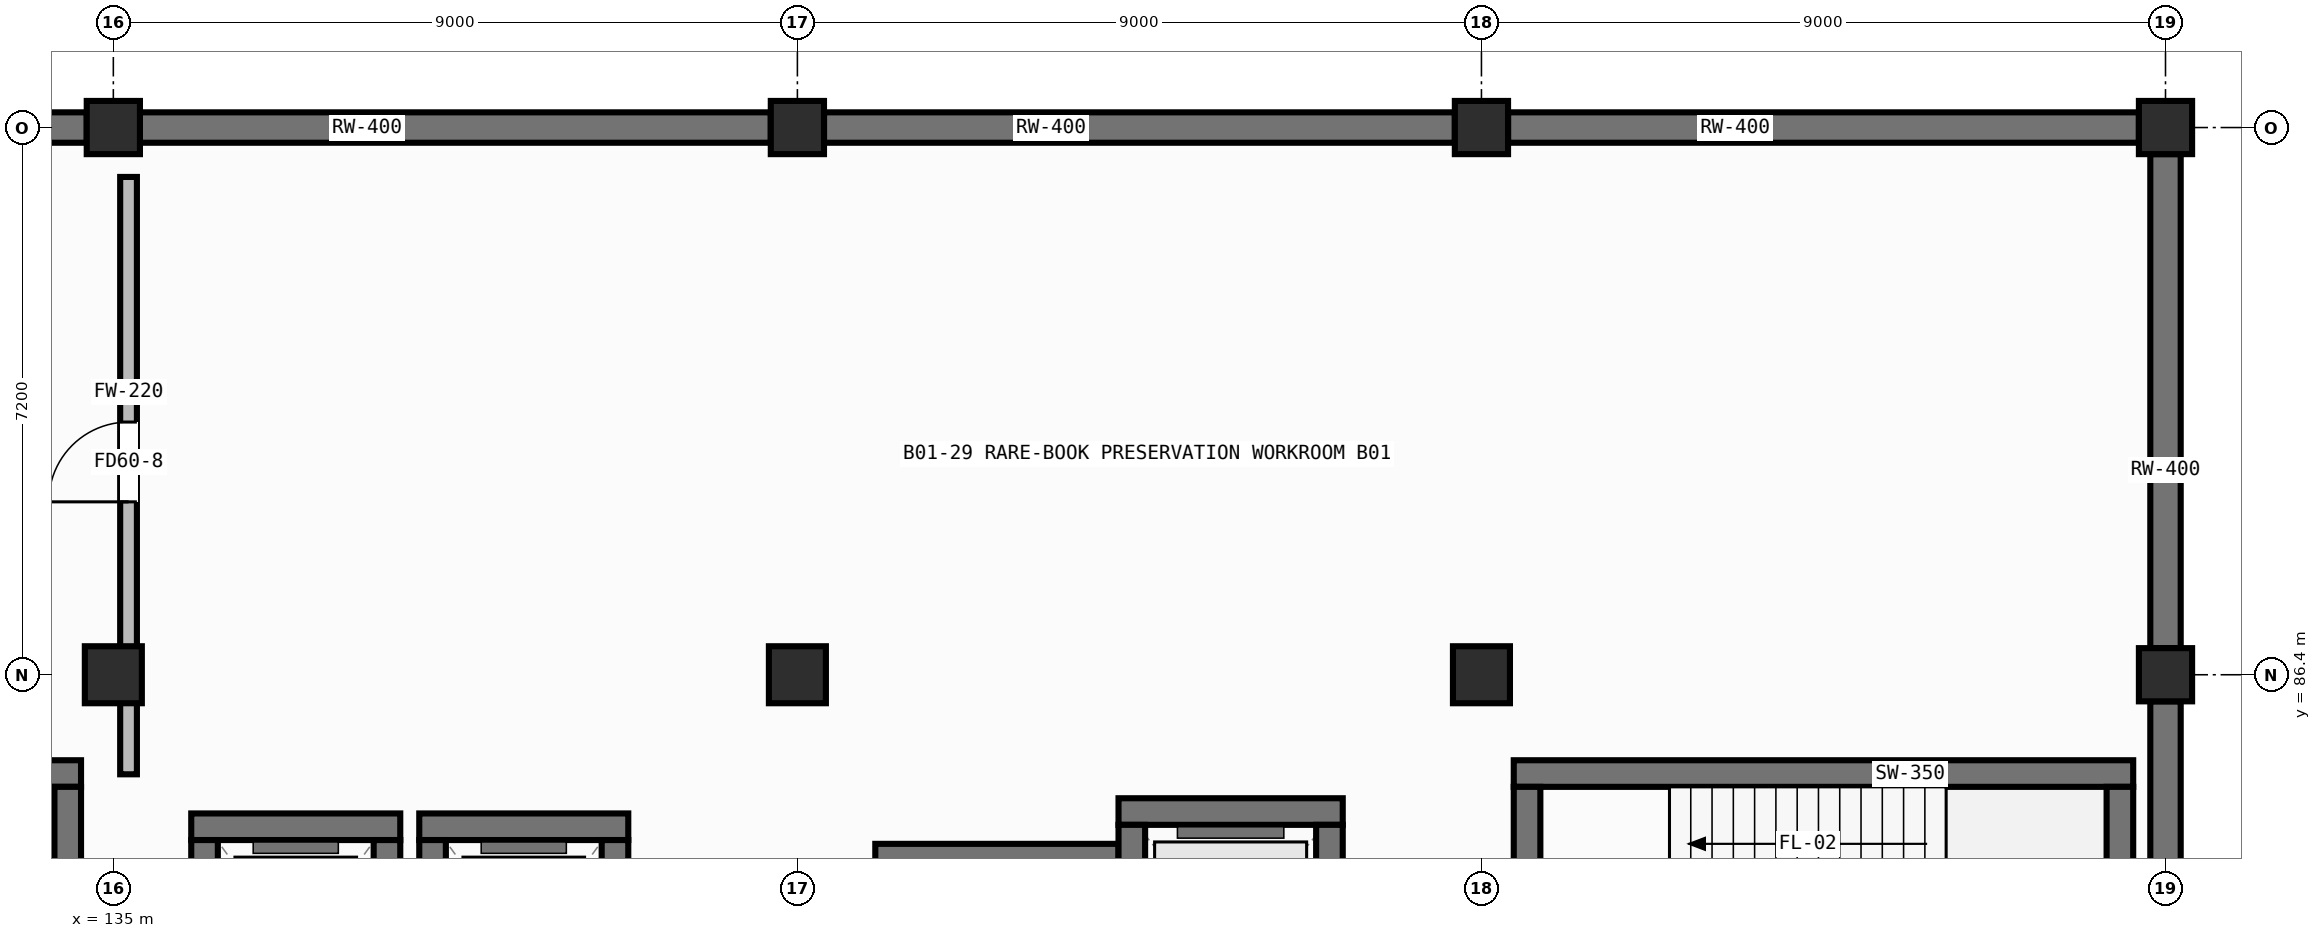
"""IFC4 building model, lengths in metres.
Left out: names, types, materials, properties, quantities, classifications, styles, units other than length and angle.
Written with IfcOpenShell. Run it as: python <this file> out.ifc"""

import sys

from ifc_helpers import new_model, si_unit, direction, frame, frame_2d, origin, origin_2d, place, context, subcontext, project, spatial, rectangle, hollow_rectangle, extrude, element, fill, save


model = new_model("IFC4")
c1 = context("Model", 3, precision=1e-05, world=origin(), true_north=direction((0.0, 1.0)))
c2 = subcontext(c1, "Body", "Model", "MODEL_VIEW")
j1 = project(units=[si_unit("LENGTHUNIT", "METRE"), si_unit("PLANEANGLEUNIT", "RADIAN")], contexts=[c1])
p1 = place(None, origin())
s1 = spatial("IfcSite", under=j1, at=p1, CompositionType="ELEMENT")
p2 = place(p1, origin())
s2 = spatial("IfcBuilding", under=s1, at=p2, CompositionType="ELEMENT")
p3 = place(p2, frame((0.0, 0.0, -4.9)))
s3 = spatial("IfcBuildingStorey", under=s2, at=p3, CompositionType="ELEMENT", Elevation=-4.9)
p4 = place(p3, frame((135.0, 86.4, 0.0), z_axis=(0.0, 0.0, 1.0), x_axis=(1.0, 0.0, 0.0)))
e1 = element("IfcColumn", 1, at=p4, inside=s3, PredefinedType="COLUMN", context=c2, shape_type="SweptSolid", body=[
    extrude(hollow_rectangle(XDim=0.75, YDim=0.75, WallThickness=0.032, at=origin_2d()), origin(), (0.0, 0.0, 1.0), 4.9),
])
p5 = place(p3, frame((135.0, 93.6, 0.0), z_axis=(0.0, 0.0, 1.0), x_axis=(1.0, 0.0, 0.0)))
e2 = element("IfcColumn", 2, at=p5, inside=s3, PredefinedType="COLUMN", context=c2, shape_type="SweptSolid", body=[
    extrude(hollow_rectangle(XDim=0.7, YDim=0.7, WallThickness=0.028, at=origin_2d()), origin(), (0.0, 0.0, 1.0), 4.9),
])
p6 = place(p3, frame((144.0, 86.4, 0.0), z_axis=(0.0, 0.0, 1.0), x_axis=(1.0, 0.0, 0.0)))
e3 = element("IfcColumn", 3, at=p6, inside=s3, PredefinedType="COLUMN", context=c2, shape_type="SweptSolid", body=[
    extrude(hollow_rectangle(XDim=0.75, YDim=0.75, WallThickness=0.032, at=origin_2d()), origin(), (0.0, 0.0, 1.0), 4.9),
])
p7 = place(p3, frame((144.0, 93.6, 0.0), z_axis=(0.0, 0.0, 1.0), x_axis=(1.0, 0.0, 0.0)))
e4 = element("IfcColumn", 4, at=p7, inside=s3, PredefinedType="COLUMN", context=c2, shape_type="SweptSolid", body=[
    extrude(hollow_rectangle(XDim=0.7, YDim=0.7, WallThickness=0.028, at=origin_2d()), origin(), (0.0, 0.0, 1.0), 4.9),
])
p8 = place(p3, frame((153.0, 86.4, 0.0), z_axis=(0.0, 0.0, 1.0), x_axis=(1.0, 0.0, 0.0)))
e5 = element("IfcColumn", 5, at=p8, inside=s3, PredefinedType="COLUMN", context=c2, shape_type="SweptSolid", body=[
    extrude(hollow_rectangle(XDim=0.75, YDim=0.75, WallThickness=0.032, at=origin_2d()), origin(), (0.0, 0.0, 1.0), 4.9),
])
for number, where, z_axis, x_axis in (
    (6, (153.0, 93.6, 0.0), (0.0, 0.0, 1.0), (1.0, 0.0, 0.0)),
    (7, (162.0, 86.4, 0.0), (0.0, 0.0, 1.0), (1.0, 0.0, 0.0)),
    (8, (162.0, 93.6, 0.0), (0.0, 0.0, 1.0), (1.0, 0.0, 0.0)),
):
    element("IfcColumn", number, at=place(p3, frame(where, z_axis=z_axis, x_axis=x_axis)), inside=s3, PredefinedType="COLUMN", context=c2, shape_type="SweptSolid", body=[
        extrude(hollow_rectangle(XDim=0.7, YDim=0.7, WallThickness=0.028, at=origin_2d()), origin(), (0.0, 0.0, 1.0), 4.9),
    ])
for number, where, z_axis, x_axis in (
    (9, (134.65, 93.6, 0.0), (0.0, 0.0, 1.0), (-1.0, 0.0, 0.0)),
    (10, (143.65, 93.6, 0.0), (0.0, 0.0, 1.0), (-1.0, 0.0, 0.0)),
    (11, (152.65, 93.6, 0.0), (0.0, 0.0, 1.0), (-1.0, 0.0, 0.0)),
    (12, (161.65, 93.6, 0.0), (0.0, 0.0, 1.0), (-1.0, 0.0, 0.0)),
):
    element("IfcWall", number, at=place(p3, frame(where, z_axis=z_axis, x_axis=x_axis)), inside=s3, PredefinedType="SOLIDWALL", context=c2, shape_type="SweptSolid", body=[
        extrude(rectangle(XDim=8.3, YDim=0.4, at=frame_2d((4.15, 0.0))), origin(), (0.0, 0.0, 1.0), 4.125),
    ])
for number, where, z_axis, x_axis in (
    (13, (162.0, 86.05, 0.0), (0.0, 0.0, 1.0), (0.0, -1.0, 0.0)),
    (14, (162.0, 93.25, 0.0), (0.0, 0.0, 1.0), (0.0, -1.0, 0.0)),
):
    element("IfcWall", number, at=place(p3, frame(where, z_axis=z_axis, x_axis=x_axis)), inside=s3, PredefinedType="SOLIDWALL", context=c2, shape_type="SweptSolid", body=[
        extrude(rectangle(XDim=6.5, YDim=0.4, at=frame_2d((3.25, 0.0))), origin(), (0.0, 0.0, 1.0), 4.125),
    ])
p9 = place(p3, frame((126.425, 85.1, 0.0), z_axis=(0.0, 0.0, 1.0), x_axis=(1.0, 0.0, 0.0)))
e15 = element("IfcWall", 15, at=p9, inside=s3, PredefinedType="SHEAR", context=c2, shape_type="SweptSolid", body=[
    extrude(rectangle(XDim=8.15, YDim=0.35, at=frame_2d((4.075, 0.0))), origin(), (0.0, 0.0, 1.0), 4.625),
])
p10 = place(p3, frame((134.4, 81.375, 0.0), z_axis=(0.0, 0.0, 1.0), x_axis=(0.0, 1.0, 0.0)))
e16 = element("IfcWall", 16, at=p10, inside=s3, PredefinedType="SHEAR", context=c2, shape_type="SweptSolid", body=[
    extrude(rectangle(XDim=3.55, YDim=0.35, at=frame_2d((1.775, 0.0))), origin(), (0.0, 0.0, 1.0), 4.625),
])
p11 = place(p3, frame((153.425, 85.1, 0.0), z_axis=(0.0, 0.0, 1.0), x_axis=(1.0, 0.0, 0.0)))
e17 = element("IfcWall", 17, at=p11, inside=s3, PredefinedType="SHEAR", context=c2, shape_type="SweptSolid", body=[
    extrude(rectangle(XDim=8.15, YDim=0.35, at=frame_2d((4.075, 0.0))), origin(), (0.0, 0.0, 1.0), 4.625),
])
for number, where, z_axis, x_axis in (
    (18, (153.6, 81.375, 0.0), (0.0, 0.0, 1.0), (0.0, 1.0, 0.0)),
    (19, (161.4, 81.375, 0.0), (0.0, 0.0, 1.0), (0.0, 1.0, 0.0)),
):
    element("IfcWall", number, at=place(p3, frame(where, z_axis=z_axis, x_axis=x_axis)), inside=s3, PredefinedType="SHEAR", context=c2, shape_type="SweptSolid", body=[
        extrude(rectangle(XDim=3.55, YDim=0.35, at=frame_2d((1.775, 0.0))), origin(), (0.0, 0.0, 1.0), 4.625),
    ])
p12 = place(p3, frame((136.025, 84.4, 0.0), z_axis=(0.0, 0.0, 1.0), x_axis=(1.0, 0.0, 0.0)))
e20 = element("IfcWall", 20, at=p12, inside=s3, PredefinedType="SHEAR", context=c2, shape_type="SweptSolid", body=[
    extrude(rectangle(XDim=2.75, YDim=0.35, at=frame_2d((1.375, 0.0))), origin(), (0.0, 0.0, 1.0), 4.625),
])
for number, where, z_axis, x_axis in (
    (21, (136.2, 81.375, 0.0), (0.0, 0.0, 1.0), (0.0, 1.0, 0.0)),
    (22, (138.6, 81.375, 0.0), (0.0, 0.0, 1.0), (0.0, 1.0, 0.0)),
):
    element("IfcWall", number, at=place(p3, frame(where, z_axis=z_axis, x_axis=x_axis)), inside=s3, PredefinedType="SHEAR", context=c2, shape_type="SweptSolid", body=[
        extrude(rectangle(XDim=2.85, YDim=0.35, at=frame_2d((1.425, 0.0))), origin(), (0.0, 0.0, 1.0), 4.625),
    ])
p13 = place(p3, frame((139.025, 84.4, 0.0), z_axis=(0.0, 0.0, 1.0), x_axis=(1.0, 0.0, 0.0)))
e23 = element("IfcWall", 23, at=p13, inside=s3, PredefinedType="SHEAR", context=c2, shape_type="SweptSolid", body=[
    extrude(rectangle(XDim=2.75, YDim=0.35, at=frame_2d((1.375, 0.0))), origin(), (0.0, 0.0, 1.0), 4.625),
])
for number, where, z_axis, x_axis in (
    (24, (139.2, 81.375, 0.0), (0.0, 0.0, 1.0), (0.0, 1.0, 0.0)),
    (25, (141.6, 81.375, 0.0), (0.0, 0.0, 1.0), (0.0, 1.0, 0.0)),
):
    element("IfcWall", number, at=place(p3, frame(where, z_axis=z_axis, x_axis=x_axis)), inside=s3, PredefinedType="SHEAR", context=c2, shape_type="SweptSolid", body=[
        extrude(rectangle(XDim=2.85, YDim=0.35, at=frame_2d((1.425, 0.0))), origin(), (0.0, 0.0, 1.0), 4.625),
    ])
p14 = place(p3, frame((145.025, 84.0, 0.0), z_axis=(0.0, 0.0, 1.0), x_axis=(1.0, 0.0, 0.0)))
e26 = element("IfcWall", 26, at=p14, inside=s3, PredefinedType="SHEAR", context=c2, shape_type="SweptSolid", body=[
    extrude(rectangle(XDim=3.2, YDim=0.35, at=frame_2d((1.6, 0.0))), origin(), (0.0, 0.0, 1.0), 4.625),
])
p15 = place(p3, frame((148.225, 84.6, 0.0), z_axis=(0.0, 0.0, 1.0), x_axis=(1.0, 0.0, 0.0)))
e27 = element("IfcWall", 27, at=p15, inside=s3, PredefinedType="SHEAR", context=c2, shape_type="SweptSolid", body=[
    extrude(rectangle(XDim=2.95, YDim=0.35, at=frame_2d((1.475, 0.0))), origin(), (0.0, 0.0, 1.0), 4.625),
])
for number, where, z_axis, x_axis in (
    (28, (148.4, 81.375, 0.0), (0.0, 0.0, 1.0), (0.0, 1.0, 0.0)),
    (29, (151.0, 81.375, 0.0), (0.0, 0.0, 1.0), (0.0, 1.0, 0.0)),
):
    element("IfcWall", number, at=place(p3, frame(where, z_axis=z_axis, x_axis=x_axis)), inside=s3, PredefinedType="SHEAR", context=c2, shape_type="SweptSolid", body=[
        extrude(rectangle(XDim=3.05, YDim=0.35, at=frame_2d((1.525, 0.0))), origin(), (0.0, 0.0, 1.0), 4.625),
    ])
p16 = place(p3, frame((135.2, 85.09, 0.0), z_axis=(0.0, 0.0, 1.0), x_axis=(0.0, 1.0, 0.0)))
e30 = element("IfcWall", 30, at=p16, inside=s3, PredefinedType="PARTITIONING", context=c2, shape_type="SweptSolid", body=[
    extrude(rectangle(XDim=7.86, YDim=0.22, at=frame_2d((3.93, 0.0))), origin(), (0.0, 0.0, 1.0), 3.905),
])
p17 = place(p16, frame((3.585, 0.0, 0.0)))
e31 = element("IfcOpeningElement", 31, at=p17, cuts=e30, PredefinedType="OPENING", context=c2, shape_type="SweptSolid", body=[
    extrude(rectangle(XDim=1.05, YDim=2.02, at=frame_2d((0.525, 1.01))), frame((0.0, 0.122, 0.0), z_axis=(0.0, -1.0, 0.0), x_axis=(1.0, 0.0, 0.0)), (0.0, 0.0, 1.0), 0.244),
])
p18 = place(p17, origin())
e32 = element("IfcDoor", 32, at=p18, inside=s3, OperationType="SINGLE_SWING_LEFT", PredefinedType="DOOR", context=c2, shape_type="SweptSolid", body=[
    extrude(rectangle(XDim=1.05, YDim=2.02, at=frame_2d((0.525, 1.01))), frame((0.0, 0.025, 0.0), z_axis=(0.0, -1.0, 0.0), x_axis=(1.0, 0.0, 0.0)), (0.0, 0.0, 1.0), 0.05),
])
fill(e31, e32)
save(model, sys.argv[1])
